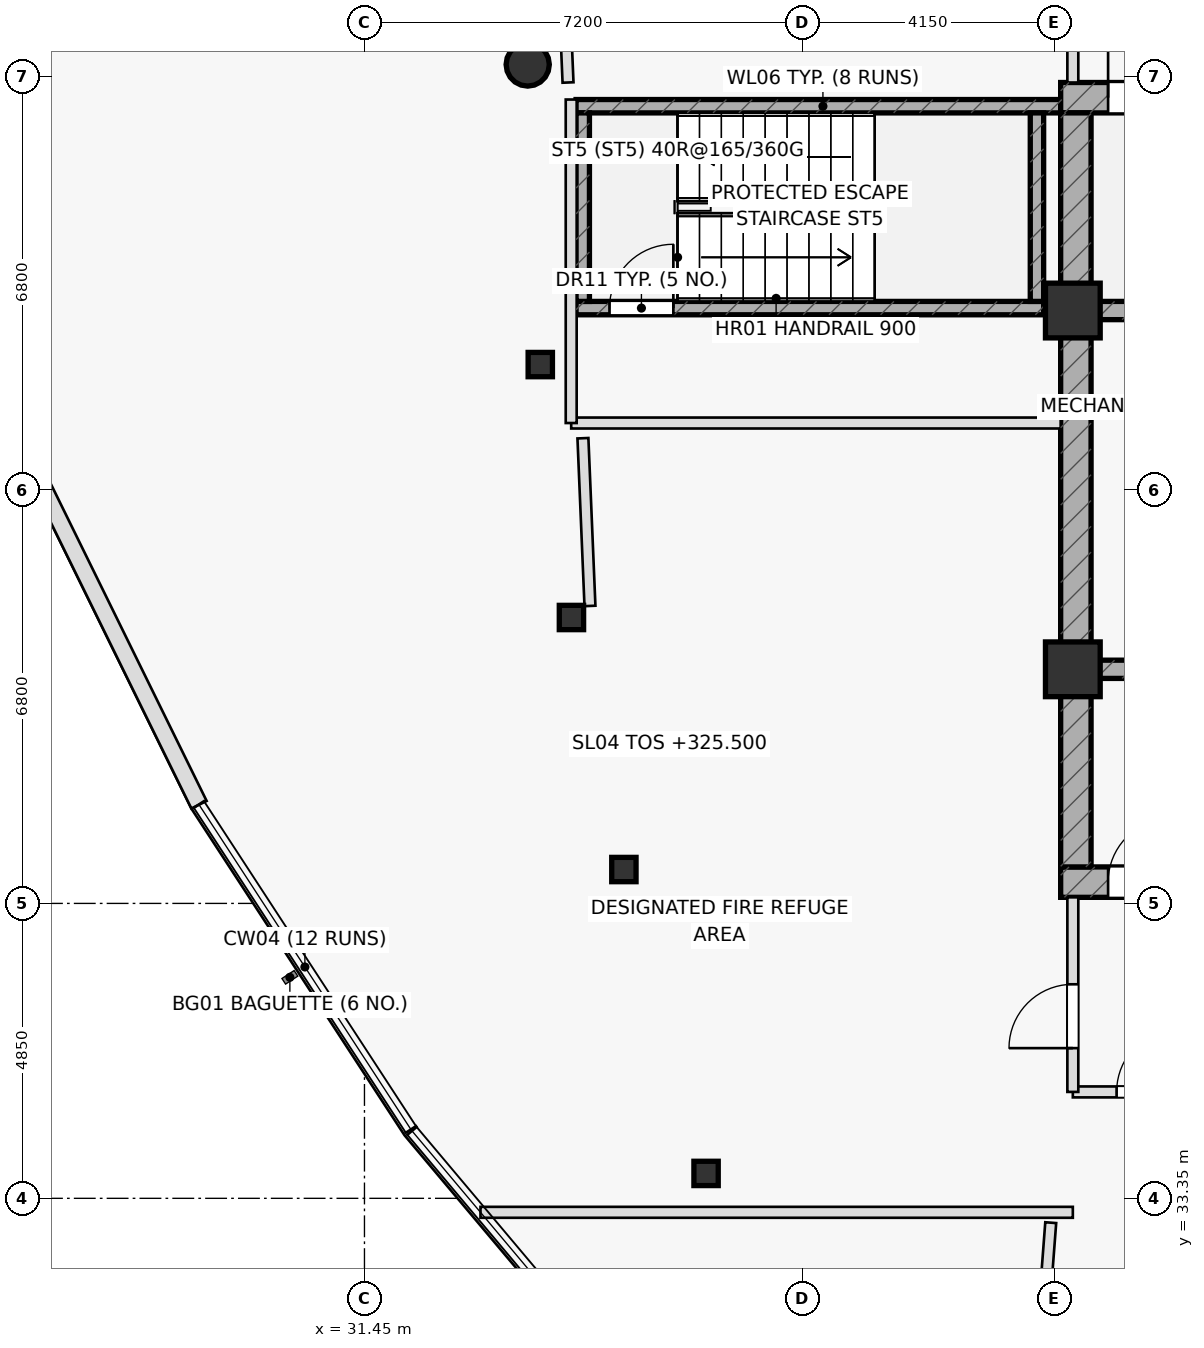
"""IFC4 building model, lengths in metres.
Left out: names, types, materials, properties, quantities, classifications, styles, units other than length and angle.
Written with IfcOpenShell. Run it as: python <this file> out.ifc"""

import sys

from ifc_helpers import new_model, si_unit, direction, frame, frame_2d, origin, origin_2d, place, context, subcontext, project, spatial, rectangle, hollow_rectangle, hollow_circle, extrude, element, fill, save


model = new_model("IFC4")
c1 = context("Model", 3, precision=1e-05, world=origin(), true_north=direction((0.0, 1.0)))
c2 = subcontext(c1, "Body", "Model", "MODEL_VIEW")
j1 = project(units=[si_unit("LENGTHUNIT", "METRE"), si_unit("PLANEANGLEUNIT", "RADIAN")], contexts=[c1])
p1 = place(None, origin())
s1 = spatial("IfcSite", under=j1, at=p1, CompositionType="ELEMENT")
p2 = place(p1, origin())
s2 = spatial("IfcBuilding", under=s1, at=p2, CompositionType="ELEMENT")
p3 = place(p2, frame((0.0, 0.0, 325.5)))
s3 = spatial("IfcBuildingStorey", under=s2, at=p3, CompositionType="ELEMENT", Elevation=325.5)
p4 = place(p3, frame((34.93, 47.99, 0.0), z_axis=(0.0, 0.0, 1.0), x_axis=(1.0, 0.0, 0.0)))
e1 = element("IfcWall", 1, at=p4, inside=s3, PredefinedType="SHEAR", context=c2, shape_type="SweptSolid", body=[
    extrude(rectangle(XDim=7.69, YDim=0.22, at=frame_2d((3.845, 0.0))), origin(), (0.0, 0.0, 1.0), 6.25),
])
p5 = place(p4, frame((0.55, 0.0, 0.0)))
e2 = element("IfcOpeningElement", 2, at=p5, cuts=e1, PredefinedType="OPENING", context=c2, shape_type="SweptSolid", body=[
    extrude(rectangle(XDim=1.05, YDim=2.2, at=frame_2d((0.525, 1.1))), frame((0.0, 0.12, 0.0), z_axis=(0.0, -1.0, 0.0), x_axis=(1.0, 0.0, 0.0)), (0.0, 0.0, 1.0), 0.24),
])
p6 = place(p3, frame((34.93, 51.31, 0.0), z_axis=(0.0, 0.0, 1.0), x_axis=(1.0, 0.0, 0.0)))
e3 = element("IfcWall", 3, at=p6, inside=s3, PredefinedType="SHEAR", context=c2, shape_type="SweptSolid", body=[
    extrude(rectangle(XDim=8.12, YDim=0.22, at=frame_2d((4.06, 0.0))), origin(), (0.0, 0.0, 1.0), 6.25),
])
for number, where, z_axis, x_axis in (
    (4, (42.51, 48.1, 0.0), (0.0, 0.0, 1.0), (0.0, 1.0, 0.0)),
    (5, (35.04, 48.1, 0.0), (0.0, 0.0, 1.0), (0.0, 1.0, 0.0)),
):
    element("IfcWall", number, at=place(p3, frame(where, z_axis=z_axis, x_axis=x_axis)), inside=s3, PredefinedType="SHEAR", context=c2, shape_type="SweptSolid", body=[
        extrude(rectangle(XDim=3.1, YDim=0.22, at=frame_2d((1.55, 0.0))), origin(), (0.0, 0.0, 1.0), 6.25),
    ])
p7 = place(p3, frame((42.9, 51.45, 0.0), z_axis=(0.0, 0.0, 1.0), x_axis=(1.0, 0.0, 0.0)))
e6 = element("IfcWall", 6, at=p7, inside=s3, PredefinedType="SHEAR", context=c2, shape_type="SweptSolid", body=[
    extrude(rectangle(XDim=14.2, YDim=0.5, at=frame_2d((7.1, 0.0))), origin(), (0.0, 0.0, 1.0), 6.25),
])
p8 = place(p7, frame((0.78, 0.0, 0.0)))
e7 = element("IfcOpeningElement", 7, at=p8, cuts=e6, PredefinedType="OPENING", context=c2, shape_type="SweptSolid", body=[
    extrude(rectangle(XDim=1.05, YDim=2.2, at=frame_2d((0.525, 1.1))), frame((0.0, 0.26, 0.0), z_axis=(0.0, -1.0, 0.0), x_axis=(1.0, 0.0, 0.0)), (0.0, 0.0, 1.0), 0.52),
])
p9 = place(p3, frame((42.9, 38.55, 0.0), z_axis=(0.0, 0.0, 1.0), x_axis=(1.0, 0.0, 0.0)))
e8 = element("IfcWall", 8, at=p9, inside=s3, PredefinedType="SHEAR", context=c2, shape_type="SweptSolid", body=[
    extrude(rectangle(XDim=14.2, YDim=0.5, at=frame_2d((7.1, 0.0))), origin(), (0.0, 0.0, 1.0), 6.25),
])
p10 = place(p9, frame((0.78, 0.0, 0.0)))
e9 = element("IfcOpeningElement", 9, at=p10, cuts=e8, PredefinedType="OPENING", context=c2, shape_type="SweptSolid", body=[
    extrude(rectangle(XDim=1.05, YDim=2.2, at=frame_2d((0.525, 1.1))), frame((0.0, 0.26, 0.0), z_axis=(0.0, -1.0, 0.0), x_axis=(1.0, 0.0, 0.0)), (0.0, 0.0, 1.0), 0.52),
])
p11 = place(p3, frame((43.15, 38.8, 0.0), z_axis=(0.0, 0.0, 1.0), x_axis=(0.0, 1.0, 0.0)))
e10 = element("IfcWall", 10, at=p11, inside=s3, PredefinedType="SHEAR", context=c2, shape_type="SweptSolid", body=[
    extrude(rectangle(XDim=12.4, YDim=0.5, at=frame_2d((6.2, 0.0))), origin(), (0.0, 0.0, 1.0), 6.25),
])
p12 = place(p3, frame((43.4, 47.95, 0.0), z_axis=(0.0, 0.0, 1.0), x_axis=(1.0, 0.0, 0.0)))
e11 = element("IfcWall", 11, at=p12, inside=s3, PredefinedType="SHEAR", context=c2, shape_type="SweptSolid", body=[
    extrude(rectangle(XDim=13.2, YDim=0.3, at=frame_2d((6.6, 0.0))), origin(), (0.0, 0.0, 1.0), 6.25),
])
p13 = place(p12, frame((8.345, 0.0, 0.0)))
e12 = element("IfcOpeningElement", 12, at=p13, cuts=e11, PredefinedType="OPENING", context=c2, shape_type="SweptSolid", body=[
    extrude(rectangle(XDim=1.15, YDim=2.2, at=frame_2d((0.575, 1.1))), frame((0.0, 0.16, 0.0), z_axis=(0.0, -1.0, 0.0), x_axis=(1.0, 0.0, 0.0)), (0.0, 0.0, 1.0), 0.32),
])
p14 = place(p12, frame((10.065, 0.0, 0.0)))
e13 = element("IfcOpeningElement", 13, at=p14, cuts=e11, PredefinedType="OPENING", context=c2, shape_type="SweptSolid", body=[
    extrude(rectangle(XDim=1.15, YDim=2.2, at=frame_2d((0.575, 1.1))), frame((0.0, 0.16, 0.0), z_axis=(0.0, -1.0, 0.0), x_axis=(1.0, 0.0, 0.0)), (0.0, 0.0, 1.0), 0.32),
])
p15 = place(p12, frame((11.645, 0.0, 0.0)))
e14 = element("IfcOpeningElement", 14, at=p15, cuts=e11, PredefinedType="OPENING", context=c2, shape_type="SweptSolid", body=[
    extrude(rectangle(XDim=1.15, YDim=2.2, at=frame_2d((0.575, 1.1))), frame((0.0, 0.16, 0.0), z_axis=(0.0, -1.0, 0.0), x_axis=(1.0, 0.0, 0.0)), (0.0, 0.0, 1.0), 0.32),
])
p16 = place(p3, frame((43.4, 42.05, 0.0), z_axis=(0.0, 0.0, 1.0), x_axis=(1.0, 0.0, 0.0)))
e15 = element("IfcWall", 15, at=p16, inside=s3, PredefinedType="SHEAR", context=c2, shape_type="SweptSolid", body=[
    extrude(rectangle(XDim=13.2, YDim=0.3, at=frame_2d((6.6, 0.0))), origin(), (0.0, 0.0, 1.0), 6.25),
])
p17 = place(p16, frame((9.1, 0.0, 0.0)))
e16 = element("IfcOpeningElement", 16, at=p17, cuts=e15, PredefinedType="OPENING", context=c2, shape_type="SweptSolid", body=[
    extrude(rectangle(XDim=0.95, YDim=2.05, at=frame_2d((0.475, 1.025))), frame((0.0, 0.16, 0.0), z_axis=(0.0, -1.0, 0.0), x_axis=(1.0, 0.0, 0.0)), (0.0, 0.0, 1.0), 0.32),
])
for number, where, z_axis, x_axis in (
    (17, (43.1, 47.95, 0.0), (0.0, 0.0, 1.0), (1.0, 0.0, 0.0)),
    (18, (43.1, 42.05, 0.0), (0.0, 0.0, 1.0), (1.0, 0.0, 0.0)),
):
    element("IfcColumn", number, at=place(p3, frame(where, z_axis=z_axis, x_axis=x_axis)), inside=s3, PredefinedType="COLUMN", context=c2, shape_type="SweptSolid", body=[
        extrude(rectangle(XDim=0.9, YDim=0.9, at=origin_2d()), origin(), (0.0, 0.0, 1.0), 6.25),
    ])
p18 = place(p3, frame((34.135, 51.996, 0.0), z_axis=(0.0, 0.0, 1.0), x_axis=(1.0, 0.0, 0.0)))
e19 = element("IfcColumn", 19, at=p18, inside=s3, PredefinedType="COLUMN", context=c2, shape_type="SweptSolid", body=[
    extrude(hollow_circle(Radius=0.355, WallThickness=0.032, at=origin_2d()), origin(), (0.0, 0.0, 1.0), 6.25),
])
for number, where, z_axis, x_axis in (
    (20, (34.342, 47.061, 0.0), (0.0, 0.0, 1.0), (1.0, 0.0, 0.0)),
    (21, (34.854, 42.902, 0.0), (0.0, 0.0, 1.0), (1.0, 0.0, 0.0)),
    (22, (35.717, 38.757, 0.0), (0.0, 0.0, 1.0), (1.0, 0.0, 0.0)),
    (23, (37.068, 33.76, 0.0), (0.0, 0.0, 1.0), (1.0, 0.0, 0.0)),
):
    element("IfcColumn", number, at=place(p3, frame(where, z_axis=z_axis, x_axis=x_axis)), inside=s3, PredefinedType="COLUMN", context=c2, shape_type="SweptSolid", body=[
        extrude(hollow_rectangle(XDim=0.4, YDim=0.4, WallThickness=0.025, at=origin_2d()), origin(), (0.0, 0.0, 1.0), 6.25),
    ])
p19 = place(p3, frame((34.617, 56.02, 0.0), z_axis=(0.0, 0.0, 1.0), x_axis=(0.041900659134, -0.999121781748, 0.0)))
e24 = element("IfcWall", 24, at=p19, inside=s3, PredefinedType="PARTITIONING", context=c2, shape_type="SweptSolid", body=[
    extrude(rectangle(XDim=4.323, YDim=0.18, at=frame_2d((2.162, 0.0))), origin(), (0.0, 0.0, 1.0), 3.725),
])
p20 = place(p3, frame((35.043, 45.85, 0.0), z_axis=(0.0, 0.0, 1.0), x_axis=(0.041829175035, -0.99912477705, 0.0)))
e25 = element("IfcWall", 25, at=p20, inside=s3, PredefinedType="PARTITIONING", context=c2, shape_type="SweptSolid", body=[
    extrude(rectangle(XDim=2.761, YDim=0.18, at=frame_2d((1.38, 0.0))), origin(), (0.0, 0.0, 1.0), 3.725),
])
p21 = place(p3, frame((43.1, 35.1, 0.0), z_axis=(0.0, 0.0, 1.0), x_axis=(1.0, 0.0, 0.0)))
e26 = element("IfcWall", 26, at=p21, inside=s3, PredefinedType="PARTITIONING", context=c2, shape_type="SweptSolid", body=[
    extrude(rectangle(XDim=2.58, YDim=0.18, at=frame_2d((1.29, 0.0))), origin(), (0.0, 0.0, 1.0), 6.25),
])
p22 = place(p21, frame((0.72, 0.0, 0.0)))
e27 = element("IfcOpeningElement", 27, at=p22, cuts=e26, PredefinedType="OPENING", context=c2, shape_type="SweptSolid", body=[
    extrude(rectangle(XDim=1.05, YDim=2.2, at=frame_2d((0.525, 1.1))), frame((0.0, 0.1, 0.0), z_axis=(0.0, -1.0, 0.0), x_axis=(1.0, 0.0, 0.0)), (0.0, 0.0, 1.0), 0.2),
])
p23 = place(p3, frame((43.1, 51.7, 0.0), z_axis=(0.0, 0.0, 1.0), x_axis=(0.0, 1.0, 0.0)))
e28 = element("IfcWall", 28, at=p23, inside=s3, PredefinedType="PARTITIONING", context=c2, shape_type="SweptSolid", body=[
    extrude(rectangle(XDim=2.6, YDim=0.18, at=frame_2d((1.3, 0.0))), origin(), (0.0, 0.0, 1.0), 4.625),
])
p24 = place(p23, frame((0.65, 0.0, 0.0)))
e29 = element("IfcOpeningElement", 29, at=p24, cuts=e28, PredefinedType="OPENING", context=c2, shape_type="SweptSolid", body=[
    extrude(rectangle(XDim=1.05, YDim=2.2, at=frame_2d((0.525, 1.1))), frame((0.0, 0.1, 0.0), z_axis=(0.0, -1.0, 0.0), x_axis=(1.0, 0.0, 0.0)), (0.0, 0.0, 1.0), 0.2),
])
p25 = place(p3, frame((43.1, 35.1, 0.0), z_axis=(0.0, 0.0, 1.0), x_axis=(0.0, 1.0, 0.0)))
e30 = element("IfcWall", 30, at=p25, inside=s3, PredefinedType="PARTITIONING", context=c2, shape_type="SweptSolid", body=[
    extrude(rectangle(XDim=3.2, YDim=0.18, at=frame_2d((1.6, 0.0))), origin(), (0.0, 0.0, 1.0), 4.625),
])
p26 = place(p25, frame((0.72, 0.0, 0.0)))
e31 = element("IfcOpeningElement", 31, at=p26, cuts=e30, PredefinedType="OPENING", context=c2, shape_type="SweptSolid", body=[
    extrude(rectangle(XDim=1.05, YDim=2.2, at=frame_2d((0.525, 1.1))), frame((0.0, 0.1, 0.0), z_axis=(0.0, -1.0, 0.0), x_axis=(1.0, 0.0, 0.0)), (0.0, 0.0, 1.0), 0.2),
])
p27 = place(p3, frame((33.358, 33.12, 0.0), z_axis=(0.0, 0.0, 1.0), x_axis=(1.0, 0.0, 0.0)))
e32 = element("IfcWall", 32, at=p27, inside=s3, PredefinedType="PARTITIONING", context=c2, shape_type="SweptSolid", body=[
    extrude(rectangle(XDim=9.742, YDim=0.18, at=frame_2d((4.871, 0.0))), origin(), (0.0, 0.0, 1.0), 4.625),
])
p28 = place(p3, frame((34.85, 46.1, 0.0), z_axis=(0.0, 0.0, 1.0), x_axis=(1.0, 0.0, 0.0)))
e33 = element("IfcWall", 33, at=p28, inside=s3, PredefinedType="PARTITIONING", context=c2, shape_type="SweptSolid", body=[
    extrude(rectangle(XDim=8.05, YDim=0.18, at=frame_2d((4.025, 0.0))), origin(), (0.0, 0.0, 1.0), 3.725),
])
p29 = place(p3, frame((34.85, 46.1, 0.0), z_axis=(0.0, 0.0, 1.0), x_axis=(0.0, 1.0, 0.0)))
e34 = element("IfcWall", 34, at=p29, inside=s3, PredefinedType="PARTITIONING", context=c2, shape_type="SweptSolid", body=[
    extrude(rectangle(XDim=5.32, YDim=0.18, at=frame_2d((2.66, 0.0))), origin(), (0.0, 0.0, 1.0), 3.725),
])
p30 = place(p3, frame((42.413, 28.69, 0.0), z_axis=(0.0, 0.0, 1.0), x_axis=(0.075783049324, 0.997124329979, 0.0)))
e35 = element("IfcWall", 35, at=p30, inside=s3, PredefinedType="PARTITIONING", context=c2, shape_type="SweptSolid", body=[
    extrude(rectangle(XDim=4.272, YDim=0.18, at=frame_2d((2.136, 0.0))), origin(), (0.0, 0.0, 1.0), 3.725),
])
p31 = place(p3, frame((25.899, 45.58, 0.0), z_axis=(0.0, 0.0, 1.0), x_axis=(0.441098066562, -0.897458910299, 0.0)))
e36 = element("IfcWall", 36, at=p31, inside=s3, PredefinedType="STANDARD", context=c2, shape_type="SweptSolid", body=[
    extrude(rectangle(XDim=6.414, YDim=0.28, at=frame_2d((3.207, 0.0))), origin(), (0.0, 0.0, 1.0), 6.25),
])
p32 = place(p8, origin())
e37 = element("IfcDoor", 37, at=p32, inside=s3, OperationType="SINGLE_SWING_LEFT", PredefinedType="DOOR", context=c2, shape_type="SweptSolid", body=[
    extrude(rectangle(XDim=1.05, YDim=2.2, at=frame_2d((0.525, 1.1))), frame((0.0, 0.025, 0.0), z_axis=(0.0, -1.0, 0.0), x_axis=(1.0, 0.0, 0.0)), (0.0, 0.0, 1.0), 0.05),
])
fill(e7, e37)
p33 = place(p10, origin())
e38 = element("IfcDoor", 38, at=p33, inside=s3, OperationType="SINGLE_SWING_RIGHT", PredefinedType="DOOR", context=c2, shape_type="SweptSolid", body=[
    extrude(rectangle(XDim=1.05, YDim=2.2, at=frame_2d((0.525, 1.1))), frame((0.0, 0.025, 0.0), z_axis=(0.0, -1.0, 0.0), x_axis=(1.0, 0.0, 0.0)), (0.0, 0.0, 1.0), 0.05),
])
fill(e9, e38)
p34 = place(p5, origin())
e39 = element("IfcDoor", 39, at=p34, inside=s3, OperationType="SINGLE_SWING_RIGHT", PredefinedType="DOOR", context=c2, shape_type="SweptSolid", body=[
    extrude(rectangle(XDim=1.05, YDim=2.2, at=frame_2d((0.525, 1.1))), frame((0.0, 0.025, 0.0), z_axis=(0.0, -1.0, 0.0), x_axis=(1.0, 0.0, 0.0)), (0.0, 0.0, 1.0), 0.05),
])
fill(e2, e39)
p35 = place(p22, origin())
e40 = element("IfcDoor", 40, at=p35, inside=s3, OperationType="SINGLE_SWING_RIGHT", PredefinedType="DOOR", context=c2, shape_type="SweptSolid", body=[
    extrude(rectangle(XDim=1.05, YDim=2.2, at=frame_2d((0.525, 1.1))), frame((0.0, 0.025, 0.0), z_axis=(0.0, -1.0, 0.0), x_axis=(1.0, 0.0, 0.0)), (0.0, 0.0, 1.0), 0.05),
])
fill(e27, e40)
p36 = place(p26, origin())
e41 = element("IfcDoor", 41, at=p36, inside=s3, OperationType="SINGLE_SWING_LEFT", PredefinedType="DOOR", context=c2, shape_type="SweptSolid", body=[
    extrude(rectangle(XDim=1.05, YDim=2.2, at=frame_2d((0.525, 1.1))), frame((0.0, 0.025, 0.0), z_axis=(0.0, -1.0, 0.0), x_axis=(1.0, 0.0, 0.0)), (0.0, 0.0, 1.0), 0.05),
])
fill(e31, e41)
save(model, sys.argv[1])
